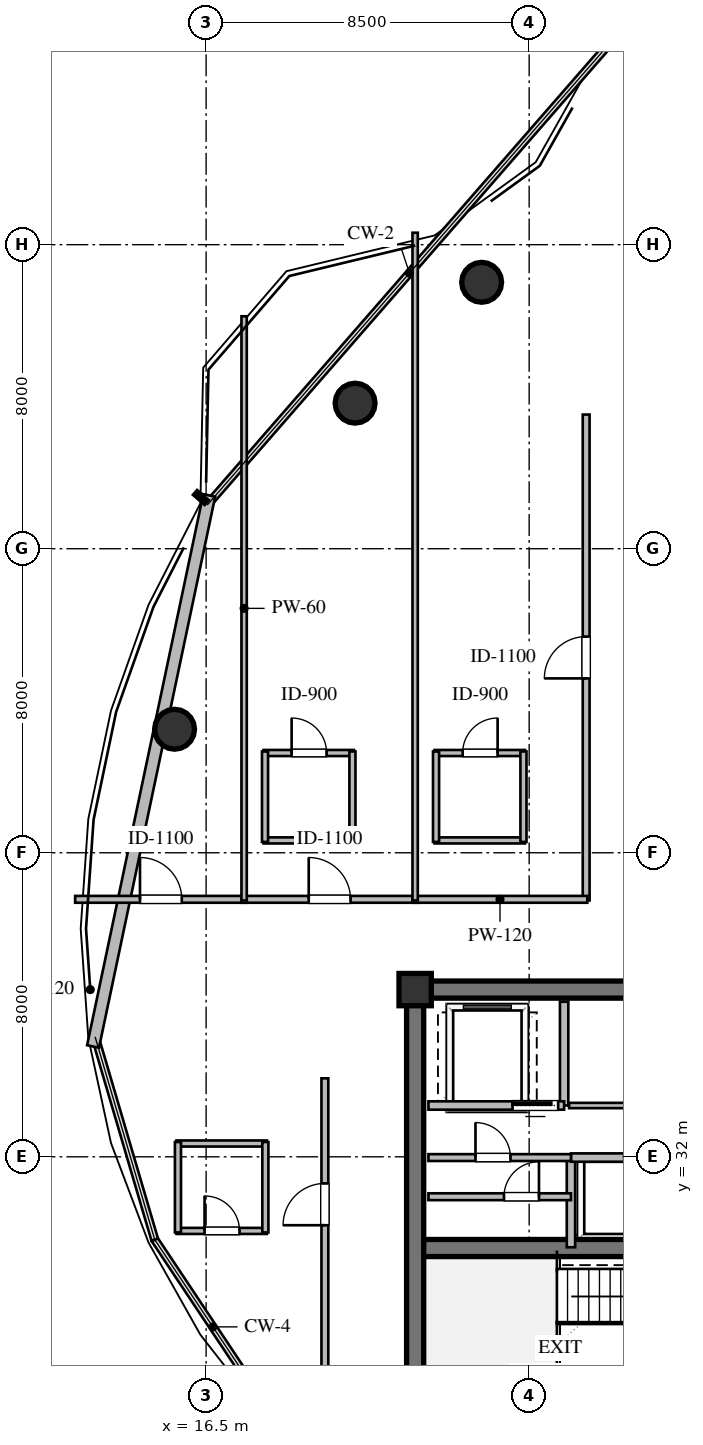
"""IFC4 building model, lengths in metres.
Left out: names, types, materials, properties, quantities, classifications, styles, units other than length and angle.
Written with IfcOpenShell. Run it as: python <this file> out.ifc"""

import sys

from ifc_helpers import new_model, si_unit, direction, frame, frame_2d, origin, origin_2d, place, context, subcontext, project, spatial, rectangle, circle, extrude, element, fill, save


model = new_model("IFC4")
c1 = context("Model", 3, precision=1e-05, world=origin(), true_north=direction((0.0, 1.0)))
c2 = subcontext(c1, "Body", "Model", "MODEL_VIEW")
j1 = project(units=[si_unit("LENGTHUNIT", "METRE"), si_unit("PLANEANGLEUNIT", "RADIAN")], contexts=[c1])
p1 = place(None, origin())
s1 = spatial("IfcSite", under=j1, at=p1, CompositionType="ELEMENT")
p2 = place(p1, origin())
s2 = spatial("IfcBuilding", under=s1, at=p2, CompositionType="ELEMENT")
p3 = place(p2, frame((0.0, 0.0, 224.4)))
s3 = spatial("IfcBuildingStorey", under=s2, at=p3, CompositionType="ELEMENT", Elevation=224.4)
p4 = place(p3, frame((21.775, 36.4, 0.0), z_axis=(0.0, 0.0, 1.0), x_axis=(1.0, 0.0, 0.0)))
e1 = element("IfcWall", 1, at=p4, inside=s3, PredefinedType="SHEAR", context=c2, shape_type="SweptSolid", body=[
    extrude(rectangle(XDim=22.45, YDim=0.45, at=frame_2d((11.225, 0.0))), origin(), (0.0, 0.0, 1.0), 3.36),
])
p5 = place(p3, frame((22.0, 23.825, 0.0), z_axis=(0.0, 0.0, 1.0), x_axis=(0.0, 1.0, 0.0)))
e2 = element("IfcWall", 2, at=p5, inside=s3, PredefinedType="SHEAR", context=c2, shape_type="SweptSolid", body=[
    extrude(rectangle(XDim=12.35, YDim=0.45, at=frame_2d((6.175, 0.0))), origin(), (0.0, 0.0, 1.0), 3.36),
])
p6 = place(p3, frame((22.225, 29.6, 0.0), z_axis=(0.0, 0.0, 1.0), x_axis=(1.0, 0.0, 0.0)))
e3 = element("IfcWall", 3, at=p6, inside=s3, PredefinedType="SHEAR", context=c2, shape_type="SweptSolid", body=[
    extrude(rectangle(XDim=21.55, YDim=0.45, at=frame_2d((10.775, 0.0))), origin(), (0.0, 0.0, 1.0), 3.36),
])
p7 = place(p6, frame((12.225, 0.0, 0.0)))
e4 = element("IfcOpeningElement", 4, at=p7, cuts=e3, PredefinedType="OPENING", context=c2, shape_type="SweptSolid", body=[
    extrude(rectangle(XDim=1.15, YDim=2.1, at=frame_2d((0.575, 1.05))), frame((0.0, 0.235, 0.0), z_axis=(0.0, -1.0, 0.0), x_axis=(1.0, 0.0, 0.0)), (0.0, 0.0, 1.0), 0.47),
])
p8 = place(p3, frame((22.0, 36.4, 0.0), z_axis=(0.0, 0.0, 1.0), x_axis=(1.0, 0.0, 0.0)))
e5 = element("IfcColumn", 5, at=p8, inside=s3, PredefinedType="COLUMN", context=c2, shape_type="SweptSolid", body=[
    extrude(rectangle(XDim=0.85, YDim=0.85, at=origin_2d()), origin(), (0.0, 0.0, 1.0), 3.6),
])
for number, where, z_axis, x_axis in (
    (6, (23.75, 55.01, 0.0), (0.0, 0.0, 1.0), (1.0, 0.0, 0.0)),
    (7, (20.42, 51.83, 0.0), (0.0, 0.0, 1.0), (1.0, 0.0, 0.0)),
    (8, (15.67, 43.25, 0.0), (0.0, 0.0, 1.0), (1.0, 0.0, 0.0)),
):
    element("IfcColumn", number, at=place(p3, frame(where, z_axis=z_axis, x_axis=x_axis)), inside=s3, PredefinedType="COLUMN", context=c2, shape_type="SweptSolid", body=[
        extrude(circle(Radius=0.525, at=origin_2d()), origin(), (0.0, 0.0, 1.0), 3.6),
    ])
p9 = place(p3, frame((13.525, 34.903, 0.0), z_axis=(0.0, 0.0, 1.0), x_axis=(0.206301080321, 0.978488561128, 0.0)))
e9 = element("IfcWall", 9, at=p9, inside=s3, PredefinedType="STANDARD", context=c2, shape_type="SweptSolid", body=[
    extrude(rectangle(XDim=14.819, YDim=0.32, at=frame_2d((7.409, 0.0))), origin(), (0.0, 0.0, 1.0), 2.817),
])
p10 = place(p3, frame((25.92, 33.35, 0.0), z_axis=(0.0, 0.0, 1.0), x_axis=(0.0, 1.0, 0.0)))
e10 = element("IfcWall", 10, at=p10, inside=s3, PredefinedType="SOLIDWALL", context=c2, shape_type="SweptSolid", body=[
    extrude(rectangle(XDim=2.73, YDim=0.22, at=frame_2d((1.365, 0.0))), origin(), (0.0, 0.0, 1.0), 3.36),
])
p11 = place(p3, frame((22.35, 33.35, 0.0), z_axis=(0.0, 0.0, 1.0), x_axis=(1.0, 0.0, 0.0)))
e11 = element("IfcWall", 11, at=p11, inside=s3, PredefinedType="SOLIDWALL", context=c2, shape_type="SweptSolid", body=[
    extrude(rectangle(XDim=3.57, YDim=0.22, at=frame_2d((1.785, 0.0))), origin(), (0.0, 0.0, 1.0), 3.36),
])
p12 = place(p11, frame((2.213, 0.0, 0.0)))
e12 = element("IfcOpeningElement", 12, at=p12, cuts=e11, PredefinedType="OPENING", context=c2, shape_type="SweptSolid", body=[
    extrude(rectangle(XDim=1.2, YDim=2.1, at=frame_2d((0.6, 1.05))), frame((0.0, 0.12, 0.0), z_axis=(0.0, -1.0, 0.0), x_axis=(1.0, 0.0, 0.0)), (0.0, 0.0, 1.0), 0.24),
])
p13 = place(p3, frame((26.1, 29.62, 0.0), z_axis=(0.0, 0.0, 1.0), x_axis=(0.0, 1.0, 0.0)))
e13 = element("IfcWall", 13, at=p13, inside=s3, PredefinedType="SOLIDWALL", context=c2, shape_type="SweptSolid", body=[
    extrude(rectangle(XDim=2.36, YDim=0.22, at=frame_2d((1.18, 0.0))), origin(), (0.0, 0.0, 1.0), 3.36),
])
p14 = place(p3, frame((26.1, 31.98, 0.0), z_axis=(0.0, 0.0, 1.0), x_axis=(1.0, 0.0, 0.0)))
e14 = element("IfcWall", 14, at=p14, inside=s3, PredefinedType="SOLIDWALL", context=c2, shape_type="SweptSolid", body=[
    extrude(rectangle(XDim=7.8, YDim=0.22, at=frame_2d((3.9, 0.0))), origin(), (0.0, 0.0, 1.0), 3.36),
])
p15 = place(p14, frame((1.4, 0.0, 0.0)))
e15 = element("IfcOpeningElement", 15, at=p15, cuts=e14, PredefinedType="OPENING", context=c2, shape_type="SweptSolid", body=[
    extrude(rectangle(XDim=1.1, YDim=2.1, at=frame_2d((0.55, 1.05))), frame((0.0, 0.12, 0.0), z_axis=(0.0, -1.0, 0.0), x_axis=(1.0, 0.0, 0.0)), (0.0, 0.0, 1.0), 0.24),
])
p16 = place(p14, frame((5.066, 0.0, 0.0)))
e16 = element("IfcOpeningElement", 16, at=p16, cuts=e14, PredefinedType="OPENING", context=c2, shape_type="SweptSolid", body=[
    extrude(rectangle(XDim=1.1, YDim=2.1, at=frame_2d((0.55, 1.05))), frame((0.0, 0.12, 0.0), z_axis=(0.0, -1.0, 0.0), x_axis=(1.0, 0.0, 0.0)), (0.0, 0.0, 1.0), 0.24),
])
p17 = place(p3, frame((26.05, 33.35, 0.0), z_axis=(0.0, 0.0, 1.0), x_axis=(1.0, 0.0, 0.0)))
e17 = element("IfcWall", 17, at=p17, inside=s3, PredefinedType="PARTITIONING", context=c2, shape_type="SweptSolid", body=[
    extrude(rectangle(XDim=3.95, YDim=0.14, at=frame_2d((1.975, 0.0))), origin(), (0.0, 0.0, 1.0), 3.36),
])
p18 = place(p17, frame((1.515, 0.0, 0.0)))
e18 = element("IfcOpeningElement", 18, at=p18, cuts=e17, PredefinedType="OPENING", context=c2, shape_type="SweptSolid", body=[
    extrude(rectangle(XDim=0.92, YDim=2.1, at=frame_2d((0.46, 1.05))), frame((0.0, 0.08, 0.0), z_axis=(0.0, -1.0, 0.0), x_axis=(1.0, 0.0, 0.0)), (0.0, 0.0, 1.0), 0.16),
])
p19 = place(p3, frame((22.35, 30.95, 0.0), z_axis=(0.0, 0.0, 1.0), x_axis=(1.0, 0.0, 0.0)))
e19 = element("IfcWall", 19, at=p19, inside=s3, PredefinedType="PARTITIONING", context=c2, shape_type="SweptSolid", body=[
    extrude(rectangle(XDim=3.75, YDim=0.18, at=frame_2d((1.875, 0.0))), origin(), (0.0, 0.0, 1.0), 3.36),
])
p20 = place(p19, frame((1.988, 0.0, 0.0)))
e20 = element("IfcOpeningElement", 20, at=p20, cuts=e19, PredefinedType="OPENING", context=c2, shape_type="SweptSolid", body=[
    extrude(rectangle(XDim=0.92, YDim=2.1, at=frame_2d((0.46, 1.05))), frame((0.0, 0.1, 0.0), z_axis=(0.0, -1.0, 0.0), x_axis=(1.0, 0.0, 0.0)), (0.0, 0.0, 1.0), 0.2),
])
p21 = place(p3, frame((22.35, 31.98, 0.0), z_axis=(0.0, 0.0, 1.0), x_axis=(1.0, 0.0, 0.0)))
e21 = element("IfcWall", 21, at=p21, inside=s3, PredefinedType="PARTITIONING", context=c2, shape_type="SweptSolid", body=[
    extrude(rectangle(XDim=3.75, YDim=0.18, at=frame_2d((1.875, 0.0))), origin(), (0.0, 0.0, 1.0), 3.36),
])
p22 = place(p21, frame((1.238, 0.0, 0.0)))
e22 = element("IfcOpeningElement", 22, at=p22, cuts=e21, PredefinedType="OPENING", context=c2, shape_type="SweptSolid", body=[
    extrude(rectangle(XDim=0.92, YDim=2.1, at=frame_2d((0.46, 1.05))), frame((0.0, 0.1, 0.0), z_axis=(0.0, -1.0, 0.0), x_axis=(1.0, 0.0, 0.0)), (0.0, 0.0, 1.0), 0.2),
])
p23 = place(p3, frame((18.01, 40.325, 0.0), z_axis=(0.0, 0.0, 1.0), x_axis=(1.0, 0.0, 0.0)))
e23 = element("IfcWall", 23, at=p23, inside=s3, PredefinedType="PLUMBINGWALL", context=c2, shape_type="SweptSolid", body=[
    extrude(rectangle(XDim=2.38, YDim=0.16, at=frame_2d((1.19, 0.0))), origin(), (0.0, 0.0, 1.0), 3.36),
])
p24 = place(p3, frame((18.01, 42.625, 0.0), z_axis=(0.0, 0.0, 1.0), x_axis=(1.0, 0.0, 0.0)))
e24 = element("IfcWall", 24, at=p24, inside=s3, PredefinedType="PLUMBINGWALL", context=c2, shape_type="SweptSolid", body=[
    extrude(rectangle(XDim=2.38, YDim=0.16, at=frame_2d((1.19, 0.0))), origin(), (0.0, 0.0, 1.0), 3.36),
])
p25 = place(p24, frame((0.74, 0.0, 0.0)))
e25 = element("IfcOpeningElement", 25, at=p25, cuts=e24, PredefinedType="OPENING", context=c2, shape_type="SweptSolid", body=[
    extrude(rectangle(XDim=0.92, YDim=2.1, at=frame_2d((0.46, 1.05))), frame((0.0, 0.09, 0.0), z_axis=(0.0, -1.0, 0.0), x_axis=(1.0, 0.0, 0.0)), (0.0, 0.0, 1.0), 0.18),
])
for number, where, z_axis, x_axis in (
    (26, (18.05, 40.285, 0.0), (0.0, 0.0, 1.0), (0.0, 1.0, 0.0)),
    (27, (20.35, 40.285, 0.0), (0.0, 0.0, 1.0), (0.0, 1.0, 0.0)),
):
    element("IfcWall", number, at=place(p3, frame(where, z_axis=z_axis, x_axis=x_axis)), inside=s3, PredefinedType="PLUMBINGWALL", context=c2, shape_type="SweptSolid", body=[
        extrude(rectangle(XDim=2.38, YDim=0.16, at=frame_2d((1.19, 0.0))), origin(), (0.0, 0.0, 1.0), 3.36),
    ])
p26 = place(p3, frame((22.51, 40.325, 0.0), z_axis=(0.0, 0.0, 1.0), x_axis=(1.0, 0.0, 0.0)))
e28 = element("IfcWall", 28, at=p26, inside=s3, PredefinedType="PLUMBINGWALL", context=c2, shape_type="SweptSolid", body=[
    extrude(rectangle(XDim=2.38, YDim=0.16, at=frame_2d((1.19, 0.0))), origin(), (0.0, 0.0, 1.0), 3.36),
])
p27 = place(p3, frame((22.51, 42.625, 0.0), z_axis=(0.0, 0.0, 1.0), x_axis=(1.0, 0.0, 0.0)))
e29 = element("IfcWall", 29, at=p27, inside=s3, PredefinedType="PLUMBINGWALL", context=c2, shape_type="SweptSolid", body=[
    extrude(rectangle(XDim=2.38, YDim=0.16, at=frame_2d((1.19, 0.0))), origin(), (0.0, 0.0, 1.0), 3.36),
])
p28 = place(p27, frame((0.74, 0.0, 0.0)))
e30 = element("IfcOpeningElement", 30, at=p28, cuts=e29, PredefinedType="OPENING", context=c2, shape_type="SweptSolid", body=[
    extrude(rectangle(XDim=0.92, YDim=2.1, at=frame_2d((0.46, 1.05))), frame((0.0, 0.09, 0.0), z_axis=(0.0, -1.0, 0.0), x_axis=(1.0, 0.0, 0.0)), (0.0, 0.0, 1.0), 0.18),
])
p29 = place(p3, frame((22.55, 40.285, 0.0), z_axis=(0.0, 0.0, 1.0), x_axis=(0.0, 1.0, 0.0)))
e31 = element("IfcWall", 31, at=p29, inside=s3, PredefinedType="PLUMBINGWALL", context=c2, shape_type="SweptSolid", body=[
    extrude(rectangle(XDim=2.38, YDim=0.16, at=frame_2d((1.19, 0.0))), origin(), (0.0, 0.0, 1.0), 2.89),
])
p30 = place(p3, frame((24.85, 40.285, 0.0), z_axis=(0.0, 0.0, 1.0), x_axis=(0.0, 1.0, 0.0)))
e32 = element("IfcWall", 32, at=p30, inside=s3, PredefinedType="PLUMBINGWALL", context=c2, shape_type="SweptSolid", body=[
    extrude(rectangle(XDim=2.38, YDim=0.16, at=frame_2d((1.19, 0.0))), origin(), (0.0, 0.0, 1.0), 3.36),
])
p31 = place(p3, frame((15.719, 30.05, 0.0), z_axis=(0.0, 0.0, 1.0), x_axis=(1.0, 0.0, 0.0)))
e33 = element("IfcWall", 33, at=p31, inside=s3, PredefinedType="PLUMBINGWALL", context=c2, shape_type="SweptSolid", body=[
    extrude(rectangle(XDim=2.38, YDim=0.16, at=frame_2d((1.19, 0.0))), origin(), (0.0, 0.0, 1.0), 3.36),
])
p32 = place(p31, frame((0.74, 0.0, 0.0)))
e34 = element("IfcOpeningElement", 34, at=p32, cuts=e33, PredefinedType="OPENING", context=c2, shape_type="SweptSolid", body=[
    extrude(rectangle(XDim=0.92, YDim=2.1, at=frame_2d((0.46, 1.05))), frame((0.0, 0.09, 0.0), z_axis=(0.0, -1.0, 0.0), x_axis=(1.0, 0.0, 0.0)), (0.0, 0.0, 1.0), 0.18),
])
p33 = place(p3, frame((15.719, 32.35, 0.0), z_axis=(0.0, 0.0, 1.0), x_axis=(1.0, 0.0, 0.0)))
e35 = element("IfcWall", 35, at=p33, inside=s3, PredefinedType="PLUMBINGWALL", context=c2, shape_type="SweptSolid", body=[
    extrude(rectangle(XDim=2.38, YDim=0.16, at=frame_2d((1.19, 0.0))), origin(), (0.0, 0.0, 1.0), 3.36),
])
p34 = place(p3, frame((15.759, 30.01, 0.0), z_axis=(0.0, 0.0, 1.0), x_axis=(0.0, 1.0, 0.0)))
e36 = element("IfcWall", 36, at=p34, inside=s3, PredefinedType="PLUMBINGWALL", context=c2, shape_type="SweptSolid", body=[
    extrude(rectangle(XDim=2.38, YDim=0.16, at=frame_2d((1.19, 0.0))), origin(), (0.0, 0.0, 1.0), 3.36),
])
p35 = place(p3, frame((18.059, 30.01, 0.0), z_axis=(0.0, 0.0, 1.0), x_axis=(0.0, 1.0, 0.0)))
e37 = element("IfcWall", 37, at=p35, inside=s3, PredefinedType="PLUMBINGWALL", context=c2, shape_type="SweptSolid", body=[
    extrude(rectangle(XDim=2.38, YDim=0.16, at=frame_2d((1.19, 0.0))), origin(), (0.0, 0.0, 1.0), 2.817),
])
p36 = place(p3, frame((13.054, 38.775, 0.0), z_axis=(0.0, 0.0, 1.0), x_axis=(1.0, 0.0, 0.0)))
e38 = element("IfcWall", 38, at=p36, inside=s3, PredefinedType="PARTITIONING", context=c2, shape_type="SweptSolid", body=[
    extrude(rectangle(XDim=4.511, YDim=0.18, at=frame_2d((2.255, 0.0))), origin(), (0.0, 0.0, 1.0), 3.36),
])
p37 = place(p36, frame((1.706, 0.0, 0.0)))
e39 = element("IfcOpeningElement", 39, at=p37, cuts=e38, PredefinedType="OPENING", context=c2, shape_type="SweptSolid", body=[
    extrude(rectangle(XDim=1.1, YDim=2.1, at=frame_2d((0.55, 1.05))), frame((0.0, 0.1, 0.0), z_axis=(0.0, -1.0, 0.0), x_axis=(1.0, 0.0, 0.0)), (0.0, 0.0, 1.0), 0.2),
])
p38 = place(p3, frame((17.435, 38.775, 0.0), z_axis=(0.0, 0.0, 1.0), x_axis=(1.0, 0.0, 0.0)))
e40 = element("IfcWall", 40, at=p38, inside=s3, PredefinedType="PARTITIONING", context=c2, shape_type="SweptSolid", body=[
    extrude(rectangle(XDim=4.63, YDim=0.18, at=frame_2d((2.315, 0.0))), origin(), (0.0, 0.0, 1.0), 3.36),
])
p39 = place(p38, frame((1.765, 0.0, 0.0)))
e41 = element("IfcOpeningElement", 41, at=p39, cuts=e40, PredefinedType="OPENING", context=c2, shape_type="SweptSolid", body=[
    extrude(rectangle(XDim=1.1, YDim=2.1, at=frame_2d((0.55, 1.05))), frame((0.0, 0.1, 0.0), z_axis=(0.0, -1.0, 0.0), x_axis=(1.0, 0.0, 0.0)), (0.0, 0.0, 1.0), 0.2),
])
p40 = place(p3, frame((26.5, 38.745, 0.0), z_axis=(0.0, 0.0, 1.0), x_axis=(0.0, 1.0, 0.0)))
e42 = element("IfcWall", 42, at=p40, inside=s3, PredefinedType="PARTITIONING", context=c2, shape_type="SweptSolid", body=[
    extrude(rectangle(XDim=12.785, YDim=0.18, at=frame_2d((6.393, 0.0))), origin(), (0.0, 0.0, 1.0), 3.36),
])
p41 = place(p40, frame((5.843, 0.0, 0.0)))
e43 = element("IfcOpeningElement", 43, at=p41, cuts=e42, PredefinedType="OPENING", context=c2, shape_type="SweptSolid", body=[
    extrude(rectangle(XDim=1.1, YDim=2.1, at=frame_2d((0.55, 1.05))), frame((0.0, 0.1, 0.0), z_axis=(0.0, -1.0, 0.0), x_axis=(1.0, 0.0, 0.0)), (0.0, 0.0, 1.0), 0.2),
])
p42 = place(p3, frame((21.935, 38.775, 0.0), z_axis=(0.0, 0.0, 1.0), x_axis=(1.0, 0.0, 0.0)))
e44 = element("IfcWall", 44, at=p42, inside=s3, PredefinedType="PARTITIONING", context=c2, shape_type="SweptSolid", body=[
    extrude(rectangle(XDim=4.595, YDim=0.18, at=frame_2d((2.297, 0.0))), origin(), (0.0, 0.0, 1.0), 3.36),
])
p43 = place(p3, frame((19.625, 24.06, 0.0), z_axis=(0.0, 0.0, 1.0), x_axis=(0.0, 1.0, 0.0)))
e45 = element("IfcWall", 45, at=p43, inside=s3, PredefinedType="PARTITIONING", context=c2, shape_type="SweptSolid", body=[
    extrude(rectangle(XDim=10.005, YDim=0.18, at=frame_2d((5.002, 0.0))), origin(), (0.0, 0.0, 1.0), 2.817),
])
p44 = place(p43, frame((6.14, 0.0, 0.0)))
e46 = element("IfcOpeningElement", 46, at=p44, cuts=e45, PredefinedType="OPENING", context=c2, shape_type="SweptSolid", body=[
    extrude(rectangle(XDim=1.1, YDim=2.1, at=frame_2d((0.55, 1.05))), frame((0.0, 0.1, 0.0), z_axis=(0.0, -1.0, 0.0), x_axis=(1.0, 0.0, 0.0)), (0.0, 0.0, 1.0), 0.2),
])
p45 = place(p3, frame((17.5, 54.116, 0.0), z_axis=(0.0, 0.0, 1.0), x_axis=(0.0, -1.0, 0.0)))
e47 = element("IfcWall", 47, at=p45, inside=s3, PredefinedType="PARTITIONING", context=c2, shape_type="SweptSolid", body=[
    extrude(rectangle(XDim=15.371, YDim=0.14, at=frame_2d((7.686, 0.0))), origin(), (0.0, 0.0, 1.0), 3.36),
])
p46 = place(p3, frame((22.0, 56.314, 0.0), z_axis=(0.0, 0.0, 1.0), x_axis=(0.0, -1.0, 0.0)))
e48 = element("IfcWall", 48, at=p46, inside=s3, PredefinedType="PARTITIONING", context=c2, shape_type="SweptSolid", body=[
    extrude(rectangle(XDim=17.569, YDim=0.14, at=frame_2d((8.784, 0.0))), origin(), (0.0, 0.0, 1.0), 2.89),
])
p47 = place(p12, origin())
e49 = element("IfcDoor", 49, at=p47, inside=s3, OperationType="SLIDING_TO_LEFT", PredefinedType="DOOR", context=c2, shape_type="SweptSolid", body=[
    extrude(rectangle(XDim=1.2, YDim=2.1, at=frame_2d((0.6, 1.05))), frame((0.0, 0.025, 0.0), z_axis=(0.0, -1.0, 0.0), x_axis=(1.0, 0.0, 0.0)), (0.0, 0.0, 1.0), 0.05),
])
fill(e12, e49)
p48 = place(p22, origin())
e50 = element("IfcDoor", 50, at=p48, inside=s3, OperationType="SINGLE_SWING_LEFT", PredefinedType="DOOR", context=c2, shape_type="SweptSolid", body=[
    extrude(rectangle(XDim=0.92, YDim=2.1, at=frame_2d((0.46, 1.05))), frame((0.0, 0.025, 0.0), z_axis=(0.0, -1.0, 0.0), x_axis=(1.0, 0.0, 0.0)), (0.0, 0.0, 1.0), 0.05),
])
fill(e22, e50)
p49 = place(p20, origin())
e51 = element("IfcDoor", 51, at=p49, inside=s3, OperationType="SINGLE_SWING_RIGHT", PredefinedType="DOOR", context=c2, shape_type="SweptSolid", body=[
    extrude(rectangle(XDim=0.92, YDim=2.1, at=frame_2d((0.46, 1.05))), frame((0.0, 0.025, 0.0), z_axis=(0.0, -1.0, 0.0), x_axis=(1.0, 0.0, 0.0)), (0.0, 0.0, 1.0), 0.05),
])
fill(e20, e51)
p50 = place(p25, origin())
e52 = element("IfcDoor", 52, at=p50, inside=s3, OperationType="SINGLE_SWING_LEFT", PredefinedType="DOOR", context=c2, shape_type="SweptSolid", body=[
    extrude(rectangle(XDim=0.92, YDim=2.1, at=frame_2d((0.46, 1.05))), frame((0.0, 0.025, 0.0), z_axis=(0.0, -1.0, 0.0), x_axis=(1.0, 0.0, 0.0)), (0.0, 0.0, 1.0), 0.05),
])
fill(e25, e52)
p51 = place(p28, origin())
e53 = element("IfcDoor", 53, at=p51, inside=s3, OperationType="SINGLE_SWING_RIGHT", PredefinedType="DOOR", context=c2, shape_type="SweptSolid", body=[
    extrude(rectangle(XDim=0.92, YDim=2.1, at=frame_2d((0.46, 1.05))), frame((0.0, 0.025, 0.0), z_axis=(0.0, -1.0, 0.0), x_axis=(1.0, 0.0, 0.0)), (0.0, 0.0, 1.0), 0.05),
])
fill(e30, e53)
p52 = place(p32, origin())
e54 = element("IfcDoor", 54, at=p52, inside=s3, OperationType="SINGLE_SWING_LEFT", PredefinedType="DOOR", context=c2, shape_type="SweptSolid", body=[
    extrude(rectangle(XDim=0.92, YDim=2.1, at=frame_2d((0.46, 1.05))), frame((0.0, 0.025, 0.0), z_axis=(0.0, -1.0, 0.0), x_axis=(1.0, 0.0, 0.0)), (0.0, 0.0, 1.0), 0.05),
])
fill(e34, e54)
p53 = place(p37, origin())
e55 = element("IfcDoor", 55, at=p53, inside=s3, OperationType="SINGLE_SWING_LEFT", PredefinedType="DOOR", context=c2, shape_type="SweptSolid", body=[
    extrude(rectangle(XDim=1.1, YDim=2.1, at=frame_2d((0.55, 1.05))), frame((0.0, 0.025, 0.0), z_axis=(0.0, -1.0, 0.0), x_axis=(1.0, 0.0, 0.0)), (0.0, 0.0, 1.0), 0.05),
])
fill(e39, e55)
p54 = place(p39, origin())
e56 = element("IfcDoor", 56, at=p54, inside=s3, OperationType="SINGLE_SWING_LEFT", PredefinedType="DOOR", context=c2, shape_type="SweptSolid", body=[
    extrude(rectangle(XDim=1.1, YDim=2.1, at=frame_2d((0.55, 1.05))), frame((0.0, 0.025, 0.0), z_axis=(0.0, -1.0, 0.0), x_axis=(1.0, 0.0, 0.0)), (0.0, 0.0, 1.0), 0.05),
])
fill(e41, e56)
p55 = place(p41, origin())
e57 = element("IfcDoor", 57, at=p55, inside=s3, OperationType="SINGLE_SWING_LEFT", PredefinedType="DOOR", context=c2, shape_type="SweptSolid", body=[
    extrude(rectangle(XDim=1.1, YDim=2.1, at=frame_2d((0.55, 1.05))), frame((0.0, 0.025, 0.0), z_axis=(0.0, -1.0, 0.0), x_axis=(1.0, 0.0, 0.0)), (0.0, 0.0, 1.0), 0.05),
])
fill(e43, e57)
p56 = place(p44, origin())
e58 = element("IfcDoor", 58, at=p56, inside=s3, OperationType="SINGLE_SWING_LEFT", PredefinedType="DOOR", context=c2, shape_type="SweptSolid", body=[
    extrude(rectangle(XDim=1.1, YDim=2.1, at=frame_2d((0.55, 1.05))), frame((0.0, 0.025, 0.0), z_axis=(0.0, -1.0, 0.0), x_axis=(1.0, 0.0, 0.0)), (0.0, 0.0, 1.0), 0.05),
])
fill(e46, e58)
save(model, sys.argv[1])
